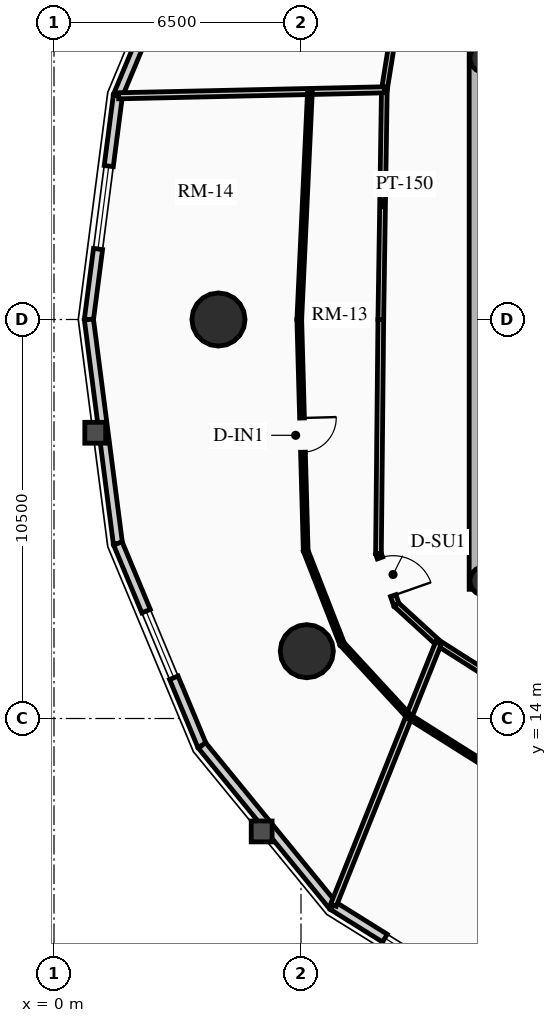
"""IFC4 building model, lengths in metres.
Left out: names, types, materials, properties, quantities, classifications, styles, units other than length and angle.
Written with IfcOpenShell. Run it as: python <this file> out.ifc"""

import sys

from ifc_helpers import new_model, si_unit, direction, frame, frame_2d, origin, origin_2d, place, context, subcontext, project, spatial, rectangle, circle, hollow_circle, extrude, source, transform, mapped, element, fill, save


model = new_model("IFC4")
c1 = context("Model", 3, precision=1e-05, world=origin(), true_north=direction((0.0, 1.0)))
c2 = subcontext(c1, "Body", "Model", "MODEL_VIEW")
j1 = project(units=[si_unit("LENGTHUNIT", "METRE"), si_unit("PLANEANGLEUNIT", "RADIAN")], contexts=[c1])
p1 = place(None, origin())
s1 = spatial("IfcSite", under=j1, at=p1, CompositionType="ELEMENT")
p2 = place(p1, origin())
s2 = spatial("IfcBuilding", under=s1, at=p2, CompositionType="ELEMENT")
p3 = place(p2, frame((0.0, 0.0, 105.07)))
s3 = spatial("IfcBuildingStorey", under=s2, at=p3, CompositionType="ELEMENT", Elevation=105.07)
p4 = place(p3, frame((11.15, 17.4, 0.0), z_axis=(0.0, 0.0, 1.0), x_axis=(0.0, 1.0, 0.0)))
e1 = element("IfcWall", 1, at=p4, inside=s3, PredefinedType="SHEAR", context=c2, shape_type="SweptSolid", body=[
    extrude(rectangle(XDim=14.2, YDim=0.45, at=frame_2d((7.1, 0.0))), origin(), (0.0, 0.0, 1.0), 2.91),
])
for number, where, z_axis, x_axis in (
    (2, (11.325, 17.62, 0.0), (0.0, 0.0, 1.0), (1.0, 0.0, 0.0)),
    (3, (11.325, 31.38, 0.0), (0.0, 0.0, 1.0), (1.0, 0.0, 0.0)),
):
    element("IfcColumn", number, at=place(p3, frame(where, z_axis=z_axis, x_axis=x_axis)), inside=s3, PredefinedType="COLUMN", context=c2, shape_type="SweptSolid", body=[
        extrude(hollow_circle(Radius=0.38, WallThickness=0.032, at=origin_2d()), origin(), (0.0, 0.0, 1.0), 2.91),
    ])
for number, where, z_axis, x_axis in (
    (4, (4.328, 24.5, 0.0), (0.0, 0.0, 1.0), (1.0, 0.0, 0.0)),
    (5, (6.653, 15.771, 0.0), (0.0, 0.0, 1.0), (1.0, 0.0, 0.0)),
):
    element("IfcColumn", number, at=place(p3, frame(where, z_axis=z_axis, x_axis=x_axis)), inside=s3, PredefinedType="USERDEFINED", context=c2, shape_type="SweptSolid", body=[
        extrude(circle(Radius=0.7, at=origin_2d()), origin(), (0.0, 0.0, 1.0), 2.91),
    ])
p5 = place(p3, frame((1.682, 30.393, 0.0), z_axis=(0.0, 0.0, 1.0), x_axis=(0.384344417632, 0.923189779317, 0.0)))
e6 = element("IfcWall", 6, at=p5, inside=s3, PredefinedType="SOLIDWALL", context=c2, shape_type="SweptSolid", body=[
    extrude(rectangle(XDim=5.758, YDim=0.24, at=frame_2d((2.879, 0.0))), origin(), (0.0, 0.0, 1.0), 2.179),
])
p6 = place(p3, frame((0.919, 24.5, 0.0), z_axis=(0.0, 0.0, 1.0), x_axis=(0.128351991996, 0.991728675672, 0.0)))
e7 = element("IfcWall", 7, at=p6, inside=s3, PredefinedType="SOLIDWALL", context=c2, shape_type="SweptSolid", body=[
    extrude(rectangle(XDim=5.942, YDim=0.24, at=frame_2d((2.971, 0.0))), origin(), (0.0, 0.0, 1.0), 2.179),
])
m1 = source(origin(), c2, "Body", "SweptSolid", [
    extrude(rectangle(XDim=2.2, YDim=1.35, at=frame_2d((1.1, 0.675))), frame((0.0, 0.13, 0.0), z_axis=(0.0, -1.0, 0.0), x_axis=(1.0, 0.0, 0.0)), (0.0, 0.0, 1.0), 0.26),
])
p7 = place(p6, frame((1.871, 0.0, 0.65)))
e8 = element("IfcOpeningElement", 8, at=p7, cuts=e7, PredefinedType="OPENING", context=c2, shape_type="MappedRepresentation", body=[
    mapped(m1, transform((0.0, 0.0, 0.0), x_axis=(1.0, 0.0, 0.0), y_axis=(0.0, 1.0, 0.0), z_axis=(0.0, 0.0, 1.0), scale=1.0)),
])
p8 = place(p3, frame((1.682, 18.607, 0.0), z_axis=(0.0, 0.0, 1.0), x_axis=(-0.128351991996, 0.991728675672, 0.0)))
e9 = element("IfcWall", 9, at=p8, inside=s3, PredefinedType="SOLIDWALL", context=c2, shape_type="SweptSolid", body=[
    extrude(rectangle(XDim=5.942, YDim=0.24, at=frame_2d((2.971, 0.0))), origin(), (0.0, 0.0, 1.0), 2.179),
])
p9 = place(p3, frame((3.895, 13.291, 0.0), z_axis=(0.0, 0.0, 1.0), x_axis=(-0.384344417632, 0.923189779317, 0.0)))
e10 = element("IfcWall", 10, at=p9, inside=s3, PredefinedType="SOLIDWALL", context=c2, shape_type="SweptSolid", body=[
    extrude(rectangle(XDim=5.758, YDim=0.24, at=frame_2d((2.879, 0.0))), origin(), (0.0, 0.0, 1.0), 2.179),
])
m2 = source(origin(), c2, "Body", "SweptSolid", [
    extrude(rectangle(XDim=1.9, YDim=1.35, at=frame_2d((0.95, 0.675))), frame((0.0, 0.13, 0.0), z_axis=(0.0, -1.0, 0.0), x_axis=(1.0, 0.0, 0.0)), (0.0, 0.0, 1.0), 0.26),
])
p10 = place(p9, frame((1.929, 0.0, 0.65)))
e11 = element("IfcOpeningElement", 11, at=p10, cuts=e10, PredefinedType="OPENING", context=c2, shape_type="MappedRepresentation", body=[
    mapped(m2, transform((0.0, 0.0, 0.0), x_axis=(1.0, 0.0, 0.0), y_axis=(0.0, 1.0, 0.0), z_axis=(0.0, 0.0, 1.0), scale=1.0)),
])
p11 = place(p3, frame((7.342, 9.072, 0.0), z_axis=(0.0, 0.0, 1.0), x_axis=(-0.632700781152, 0.77439635945, 0.0)))
e12 = element("IfcWall", 12, at=p11, inside=s3, PredefinedType="SOLIDWALL", context=c2, shape_type="SweptSolid", body=[
    extrude(rectangle(XDim=5.448, YDim=0.24, at=frame_2d((2.724, 0.0))), origin(), (0.0, 0.0, 1.0), 2.179),
])
p12 = place(p3, frame((11.685, 6.363, 0.0), z_axis=(0.0, 0.0, 1.0), x_axis=(-0.848520380187, 0.529162701263, 0.0)))
e13 = element("IfcWall", 13, at=p12, inside=s3, PredefinedType="SOLIDWALL", context=c2, shape_type="SweptSolid", body=[
    extrude(rectangle(XDim=5.119, YDim=0.24, at=frame_2d((2.56, 0.0))), origin(), (0.0, 0.0, 1.0), 2.179),
])
p13 = place(p12, frame((1.609, 0.0, 0.65)))
e14 = element("IfcOpeningElement", 14, at=p13, cuts=e13, PredefinedType="OPENING", context=c2, shape_type="MappedRepresentation", body=[
    mapped(m2, transform((0.0, 0.0, 0.0), x_axis=(1.0, 0.0, 0.0), y_axis=(0.0, 1.0, 0.0), z_axis=(0.0, 0.0, 1.0), scale=1.0)),
])
p14 = place(p3, frame((8.94, 32.078, 0.0), z_axis=(0.0, 0.0, 1.0), x_axis=(-0.159148467753, -0.98725466077, 0.0)))
e15 = element("IfcWall", 15, at=p14, inside=s3, PredefinedType="PARTITIONING", context=c2, shape_type="SweptSolid", body=[
    extrude(rectangle(XDim=1.554, YDim=0.15, at=frame_2d((0.777, 0.0))), origin(), (0.0, 0.0, 1.0), 2.225),
])
p15 = place(p3, frame((8.693, 30.544, 0.0), z_axis=(0.0, 0.0, 1.0), x_axis=(-0.015307007986, -0.99988284089, 0.0)))
e16 = element("IfcWall", 16, at=p15, inside=s3, PredefinedType="PARTITIONING", context=c2, shape_type="SweptSolid", body=[
    extrude(rectangle(XDim=6.045, YDim=0.15, at=frame_2d((3.022, 0.0))), origin(), (0.0, 0.0, 1.0), 2.655),
])
p16 = place(p3, frame((8.6, 24.5, 0.0), z_axis=(0.0, 0.0, 1.0), x_axis=(-0.010023665349, -0.999949761805, 0.0)))
e17 = element("IfcWall", 17, at=p16, inside=s3, PredefinedType="PARTITIONING", context=c2, shape_type="SweptSolid", body=[
    extrude(rectangle(XDim=6.162, YDim=0.15, at=frame_2d((3.081, 0.0))), origin(), (0.0, 0.0, 1.0), 2.225),
])
p17 = place(p3, frame((8.538, 18.338, 0.0), z_axis=(0.0, 0.0, 1.0), x_axis=(0.331358150167, -0.94350504838, 0.0)))
e18 = element("IfcWall", 18, at=p17, inside=s3, PredefinedType="PARTITIONING", context=c2, shape_type="SweptSolid", body=[
    extrude(rectangle(XDim=1.424, YDim=0.15, at=frame_2d((0.712, 0.0))), origin(), (0.0, 0.0, 1.0), 2.225),
])
m3 = source(origin(), c2, "Body", "SweptSolid", [
    extrude(rectangle(XDim=1.05, YDim=2.015, at=frame_2d((0.525, 1.007))), frame((0.0, 0.085, 0.0), z_axis=(0.0, -1.0, 0.0), x_axis=(1.0, 0.0, 0.0)), (0.0, 0.0, 1.0), 0.17),
])
p18 = place(p17, frame((0.12, 0.0, 0.0)))
e19 = element("IfcOpeningElement", 19, at=p18, cuts=e18, PredefinedType="OPENING", context=c2, shape_type="MappedRepresentation", body=[
    mapped(m3, transform((0.0, 0.0, 0.0), x_axis=(1.0, 0.0, 0.0), y_axis=(0.0, 1.0, 0.0), z_axis=(0.0, 0.0, 1.0), scale=1.0)),
])
p19 = place(p3, frame((9.01, 16.994, 0.0), z_axis=(0.0, 0.0, 1.0), x_axis=(0.737701798986, -0.67512669609, 0.0)))
e20 = element("IfcWall", 20, at=p19, inside=s3, PredefinedType="PARTITIONING", context=c2, shape_type="SweptSolid", body=[
    extrude(rectangle(XDim=1.498, YDim=0.15, at=frame_2d((0.749, 0.0))), origin(), (0.0, 0.0, 1.0), 2.225),
])
p20 = place(p3, frame((10.115, 15.983, 0.0), z_axis=(0.0, 0.0, 1.0), x_axis=(0.843995849351, -0.536349705209, 0.0)))
e21 = element("IfcWall", 21, at=p20, inside=s3, PredefinedType="PARTITIONING", context=c2, shape_type="SweptSolid", body=[
    extrude(rectangle(XDim=1.593, YDim=0.15, at=frame_2d((0.796, 0.0))), origin(), (0.0, 0.0, 1.0), 2.225),
])
p21 = place(p3, frame((8.693, 30.544, 0.0), z_axis=(0.0, 0.0, 1.0), x_axis=(-0.999746482141, -0.022516026432, 0.0)))
e22 = element("IfcWall", 22, at=p21, inside=s3, PredefinedType="PARTITIONING", context=c2, shape_type="SweptSolid", body=[
    extrude(rectangle(XDim=6.994, YDim=0.16, at=frame_2d((3.497, 0.0))), origin(), (0.0, 0.0, 1.0), 2.179),
])
p22 = place(p3, frame((10.115, 15.983, 0.0), z_axis=(0.0, 0.0, 1.0), x_axis=(-0.371861013147, -0.928288417951, 0.0)))
e23 = element("IfcWall", 23, at=p22, inside=s3, PredefinedType="PARTITIONING", context=c2, shape_type="SweptSolid", body=[
    extrude(rectangle(XDim=7.427, YDim=0.16, at=frame_2d((3.714, 0.0))), origin(), (0.0, 0.0, 1.0), 2.179),
])
p23 = place(p3, frame((6.735, 30.5, 0.0), z_axis=(0.0, 0.0, 1.0), x_axis=(-0.046620801603, -0.998912659274, 0.0)))
e24 = element("IfcWall", 24, at=p23, inside=s3, PredefinedType="PARTITIONING", context=c2, shape_type="SweptSolid", body=[
    extrude(rectangle(XDim=6.007, YDim=0.125, at=frame_2d((3.003, 0.0))), origin(), (0.0, 0.0, 1.0), 2.655),
])
p24 = place(p3, frame((6.455, 24.5, 0.0), z_axis=(0.0, 0.0, 1.0), x_axis=(0.027753708707, -0.999614791634, 0.0)))
e25 = element("IfcWall", 25, at=p24, inside=s3, PredefinedType="PARTITIONING", context=c2, shape_type="SweptSolid", body=[
    extrude(rectangle(XDim=6.087, YDim=0.125, at=frame_2d((3.044, 0.0))), origin(), (0.0, 0.0, 1.0), 2.225),
])
m4 = source(origin(), c2, "Body", "SweptSolid", [
    extrude(rectangle(XDim=0.9, YDim=2.005, at=frame_2d((0.45, 1.002))), frame((0.0, 0.073, 0.0), z_axis=(0.0, -1.0, 0.0), x_axis=(1.0, 0.0, 0.0)), (0.0, 0.0, 1.0), 0.145),
])
p25 = place(p24, frame((2.594, 0.0, 0.0)))
e26 = element("IfcOpeningElement", 26, at=p25, cuts=e25, PredefinedType="OPENING", context=c2, shape_type="MappedRepresentation", body=[
    mapped(m4, transform((0.0, 0.0, 0.0), x_axis=(1.0, 0.0, 0.0), y_axis=(0.0, 1.0, 0.0), z_axis=(0.0, 0.0, 1.0), scale=1.0)),
])
p26 = place(p3, frame((6.624, 18.415, 0.0), z_axis=(0.0, 0.0, 1.0), x_axis=(0.363854295337, -0.931455877519, 0.0)))
e27 = element("IfcWall", 27, at=p26, inside=s3, PredefinedType="PARTITIONING", context=c2, shape_type="SweptSolid", body=[
    extrude(rectangle(XDim=2.635, YDim=0.125, at=frame_2d((1.317, 0.0))), origin(), (0.0, 0.0, 1.0), 2.225),
])
p27 = place(p3, frame((7.583, 15.961, 0.0), z_axis=(0.0, 0.0, 1.0), x_axis=(0.677838563189, -0.735210774032, 0.0)))
e28 = element("IfcWall", 28, at=p27, inside=s3, PredefinedType="PARTITIONING", context=c2, shape_type="SweptSolid", body=[
    extrude(rectangle(XDim=2.596, YDim=0.125, at=frame_2d((1.298, 0.0))), origin(), (0.0, 0.0, 1.0), 2.655),
])
p28 = place(p3, frame((9.342, 14.052, 0.0), z_axis=(0.0, 0.0, 1.0), x_axis=(0.846526826244, -0.532346064557, 0.0)))
e29 = element("IfcWall", 29, at=p28, inside=s3, PredefinedType="PARTITIONING", context=c2, shape_type="SweptSolid", body=[
    extrude(rectangle(XDim=2.578, YDim=0.125, at=frame_2d((1.289, 0.0))), origin(), (0.0, 0.0, 1.0), 2.225),
])
m5 = source(origin(), c2, "Body", "SweptSolid", [
    extrude(rectangle(XDim=2.2, YDim=1.35, at=frame_2d((1.1, 0.675))), frame((0.0, 0.03, 0.0), z_axis=(0.0, -1.0, 0.0), x_axis=(1.0, 0.0, 0.0)), (0.0, 0.0, 1.0), 0.06),
])
p29 = place(p7, origin())
e30 = element("IfcWindow", 30, at=p29, inside=s3, PartitioningType="DOUBLE_PANEL_VERTICAL", PredefinedType="WINDOW", context=c2, shape_type="MappedRepresentation", body=[
    mapped(m5, transform((0.0, 0.0, 0.0), x_axis=(1.0, 0.0, 0.0), y_axis=(0.0, 1.0, 0.0), z_axis=(0.0, 0.0, 1.0), scale=1.0)),
])
fill(e8, e30)
m6 = source(origin(), c2, "Body", "SweptSolid", [
    extrude(rectangle(XDim=1.9, YDim=1.35, at=frame_2d((0.95, 0.675))), frame((0.0, 0.03, 0.0), z_axis=(0.0, -1.0, 0.0), x_axis=(1.0, 0.0, 0.0)), (0.0, 0.0, 1.0), 0.06),
])
p30 = place(p10, origin())
e31 = element("IfcWindow", 31, at=p30, inside=s3, PartitioningType="DOUBLE_PANEL_VERTICAL", PredefinedType="WINDOW", context=c2, shape_type="MappedRepresentation", body=[
    mapped(m6, transform((0.0, 0.0, 0.0), x_axis=(1.0, 0.0, 0.0), y_axis=(0.0, 1.0, 0.0), z_axis=(0.0, 0.0, 1.0), scale=1.0)),
])
fill(e11, e31)
p31 = place(p13, origin())
e32 = element("IfcWindow", 32, at=p31, inside=s3, PartitioningType="DOUBLE_PANEL_VERTICAL", PredefinedType="WINDOW", context=c2, shape_type="MappedRepresentation", body=[
    mapped(m6, transform((0.0, 0.0, 0.0), x_axis=(1.0, 0.0, 0.0), y_axis=(0.0, 1.0, 0.0), z_axis=(0.0, 0.0, 1.0), scale=1.0)),
])
fill(e14, e32)
m7 = source(origin(), c2, "Body", "SweptSolid", [
    extrude(rectangle(XDim=1.05, YDim=2.015, at=frame_2d((0.525, 1.007))), frame((0.0, 0.025, 0.0), z_axis=(0.0, -1.0, 0.0), x_axis=(1.0, 0.0, 0.0)), (0.0, 0.0, 1.0), 0.05),
])
p32 = place(p18, origin())
e33 = element("IfcDoor", 33, at=p32, inside=s3, OperationType="SINGLE_SWING_RIGHT", PredefinedType="DOOR", context=c2, shape_type="MappedRepresentation", body=[
    mapped(m7, transform((0.0, 0.0, 0.0), x_axis=(1.0, 0.0, 0.0), y_axis=(0.0, 1.0, 0.0), z_axis=(0.0, 0.0, 1.0), scale=1.0)),
])
fill(e19, e33)
m8 = source(origin(), c2, "Body", "SweptSolid", [
    extrude(rectangle(XDim=0.9, YDim=2.005, at=frame_2d((0.45, 1.002))), frame((0.0, 0.025, 0.0), z_axis=(0.0, -1.0, 0.0), x_axis=(1.0, 0.0, 0.0)), (0.0, 0.0, 1.0), 0.05),
])
p33 = place(p25, origin())
e34 = element("IfcDoor", 34, at=p33, inside=s3, OperationType="SINGLE_SWING_LEFT", PredefinedType="DOOR", context=c2, shape_type="MappedRepresentation", body=[
    mapped(m8, transform((0.0, 0.0, 0.0), x_axis=(1.0, 0.0, 0.0), y_axis=(0.0, 1.0, 0.0), z_axis=(0.0, 0.0, 1.0), scale=1.0)),
])
fill(e26, e34)
save(model, sys.argv[1])
